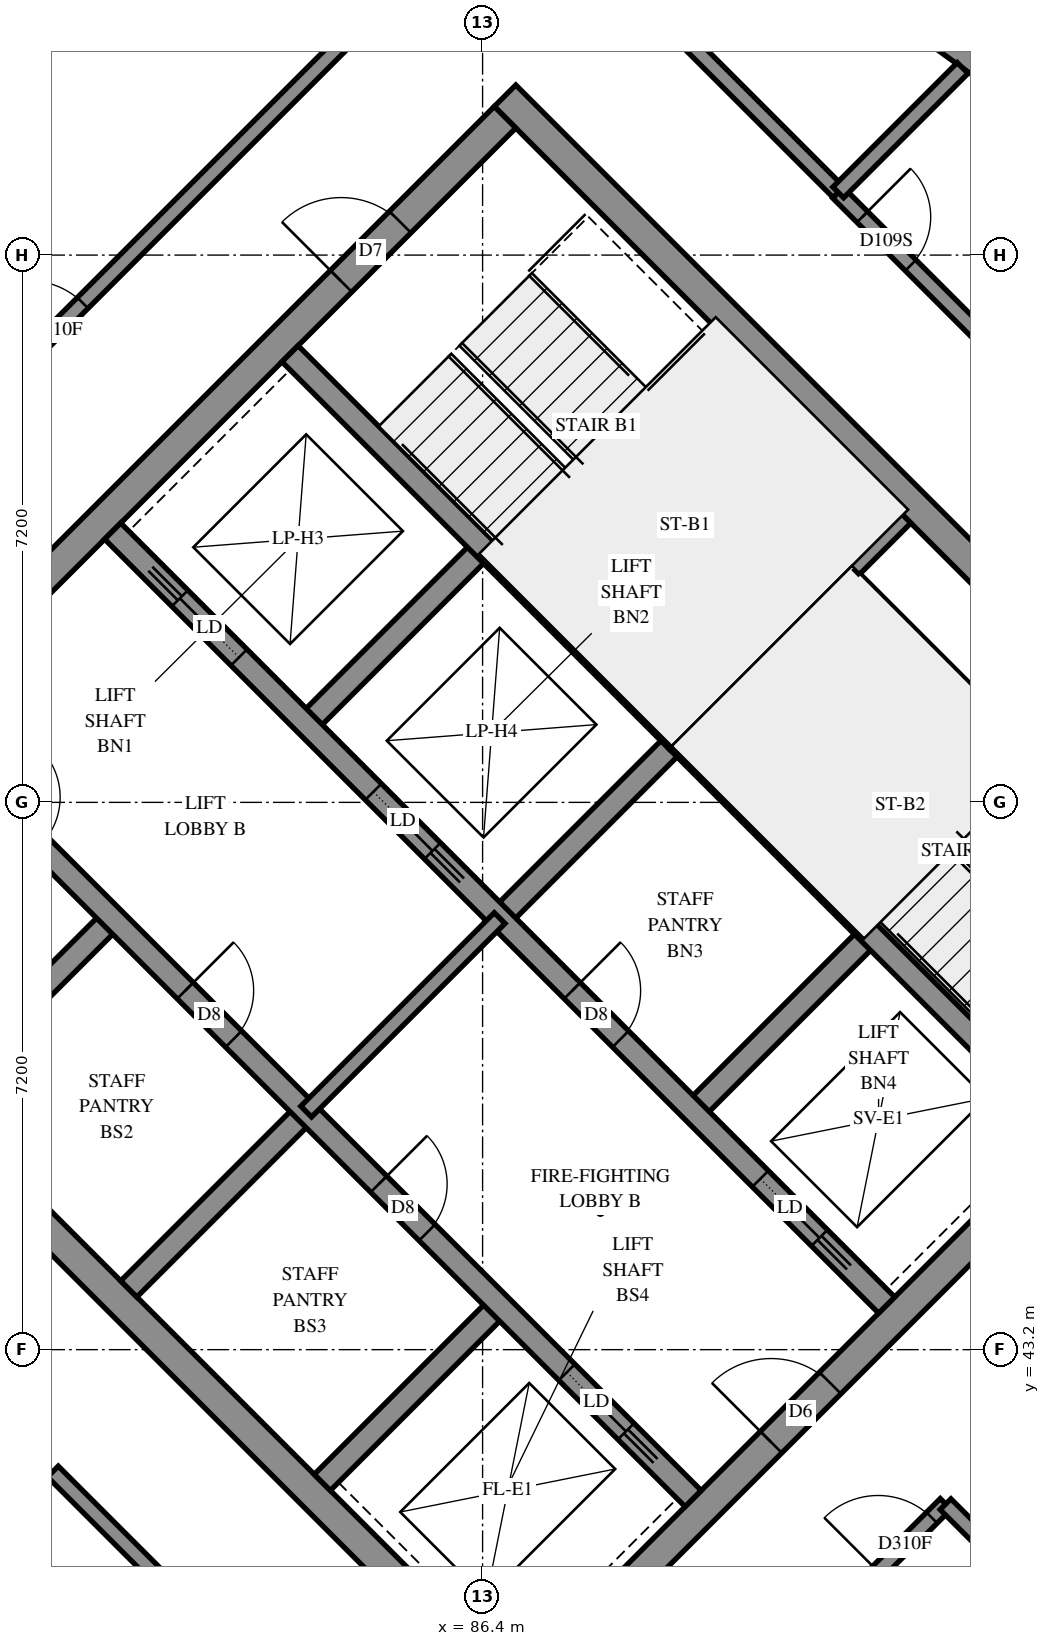
"""IFC4 building model, lengths in metres.
Left out: names, types, materials, properties, quantities, classifications, styles, units other than length and angle.
Written with IfcOpenShell. Run it as: python <this file> out.ifc"""

import sys

from ifc_helpers import new_model, si_unit, direction, frame, frame_2d, origin, place, context, subcontext, project, spatial, polyline, rectangle, outline, extrude, element, fill, save


model = new_model("IFC4")
c1 = context("Model", 3, precision=1e-05, world=origin(), true_north=direction((0.0, 1.0)))
c2 = subcontext(c1, "Body", "Model", "MODEL_VIEW")
j1 = project(units=[si_unit("LENGTHUNIT", "METRE"), si_unit("PLANEANGLEUNIT", "RADIAN")], contexts=[c1])
p1 = place(None, origin())
s1 = spatial("IfcSite", under=j1, at=p1, CompositionType="ELEMENT")
p2 = place(p1, origin())
s2 = spatial("IfcBuilding", under=s1, at=p2, CompositionType="ELEMENT")
p3 = place(p2, frame((0.0, 0.0, 271.0)))
s3 = spatial("IfcBuildingStorey", under=s2, at=p3, CompositionType="ELEMENT", Elevation=271.0)
p4 = place(p3, frame((76.23, 49.231, -0.3), z_axis=(0.0, 0.0, 1.0), x_axis=(0.7071034917, -0.7071100706, 0.0)))
e1 = element("IfcWall", 1, at=p4, inside=s3, PredefinedType="SHEAR", context=c2, shape_type="SweptSolid", body=[
    extrude(rectangle(XDim=15.2, YDim=0.4, at=frame_2d((7.6, 0.0))), origin(), (0.0, 0.0, 1.0), 2.7),
])
p5 = place(p3, frame((86.695, 59.696, -0.3), z_axis=(0.0, 0.0, 1.0), x_axis=(0.7071100706, -0.7071034917, 0.0)))
e2 = element("IfcWall", 2, at=p5, inside=s3, PredefinedType="SHEAR", context=c2, shape_type="SweptSolid", body=[
    extrude(rectangle(XDim=15.2, YDim=0.4, at=frame_2d((7.6, 0.0))), origin(), (0.0, 0.0, 1.0), 2.7),
])
p6 = place(p5, frame((10.4, 0.0, 0.3)))
e3 = element("IfcOpeningElement", 3, at=p6, cuts=e2, PredefinedType="OPENING", context=c2, shape_type="SweptSolid", body=[
    extrude(rectangle(XDim=0.8, YDim=2.1, at=frame_2d((0.4, 1.05))), frame((0.0, 0.21, 0.0), z_axis=(0.0, -1.0, 0.0), x_axis=(1.0, 0.0, 0.0)), (0.0, 0.0, 1.0), 0.42),
])
p7 = place(p3, frame((76.513, 49.231, -0.3), z_axis=(0.0, 0.0, 1.0), x_axis=(0.7071067812, 0.7071067812, 0.0)))
e4 = element("IfcWall", 4, at=p7, inside=s3, PredefinedType="SHEAR", context=c2, shape_type="SweptSolid", body=[
    extrude(rectangle(XDim=14.4, YDim=0.4, at=frame_2d((7.2, 0.0))), origin(), (0.0, 0.0, 1.0), 2.7),
])
p8 = place(p7, frame((4.55, 0.0, 0.3)))
e5 = element("IfcOpeningElement", 5, at=p8, cuts=e4, PredefinedType="OPENING", context=c2, shape_type="SweptSolid", body=[
    extrude(rectangle(XDim=1.1, YDim=2.1, at=frame_2d((0.55, 1.05))), frame((0.0, 0.21, 0.0), z_axis=(0.0, -1.0, 0.0), x_axis=(1.0, 0.0, 0.0)), (0.0, 0.0, 1.0), 0.42),
])
p9 = place(p7, frame((11.35, 0.0, 0.3)))
e6 = element("IfcOpeningElement", 6, at=p9, cuts=e4, PredefinedType="OPENING", context=c2, shape_type="SweptSolid", body=[
    extrude(rectangle(XDim=1.1, YDim=2.1, at=frame_2d((0.55, 1.05))), frame((0.0, 0.21, 0.0), z_axis=(0.0, -1.0, 0.0), x_axis=(1.0, 0.0, 0.0)), (0.0, 0.0, 1.0), 0.42),
])
p10 = place(p3, frame((86.978, 38.766, -0.3), z_axis=(0.0, 0.0, 1.0), x_axis=(0.7071067812, 0.7071067812, 0.0)))
e7 = element("IfcWall", 7, at=p10, inside=s3, PredefinedType="SHEAR", context=c2, shape_type="SweptSolid", body=[
    extrude(rectangle(XDim=14.4, YDim=0.4, at=frame_2d((7.2, 0.0))), origin(), (0.0, 0.0, 1.0), 2.7),
])
p11 = place(p10, frame((4.55, 0.0, 0.3)))
e8 = element("IfcOpeningElement", 8, at=p11, cuts=e7, PredefinedType="OPENING", context=c2, shape_type="SweptSolid", body=[
    extrude(rectangle(XDim=1.1, YDim=2.1, at=frame_2d((0.55, 1.05))), frame((0.0, 0.21, 0.0), z_axis=(0.0, -1.0, 0.0), x_axis=(1.0, 0.0, 0.0)), (0.0, 0.0, 1.0), 0.42),
])
p12 = place(p10, frame((11.35, 0.0, 0.3)))
e9 = element("IfcOpeningElement", 9, at=p12, cuts=e7, PredefinedType="OPENING", context=c2, shape_type="SweptSolid", body=[
    extrude(rectangle(XDim=1.1, YDim=2.1, at=frame_2d((0.55, 1.05))), frame((0.0, 0.21, 0.0), z_axis=(0.0, -1.0, 0.0), x_axis=(1.0, 0.0, 0.0)), (0.0, 0.0, 1.0), 0.42),
])
for number, where, z_axis, x_axis in (
    (10, (79.2, 46.544, 0.0), (0.0, 0.0, 1.0), (0.707, 0.707, 0.0)),
    (11, (84.079, 51.423, 0.0), (0.0, 0.0, 1.0), (0.707, 0.707, 0.0)),
):
    element("IfcWall", number, at=place(p3, frame(where, z_axis=z_axis, x_axis=x_axis)), inside=s3, PredefinedType="SOLIDWALL", context=c2, shape_type="SweptSolid", body=[
        extrude(rectangle(XDim=3.3, YDim=0.3, at=frame_2d((1.65, 0.0))), origin(), (0.0, 0.0, 1.0), 3.1),
    ])
p13 = place(p3, frame((81.746, 43.999, 0.0), z_axis=(0.0, 0.0, 1.0), x_axis=(0.7071067812, 0.7071067812, 0.0)))
e12 = element("IfcWall", 12, at=p13, inside=s3, PredefinedType="SOLIDWALL", context=c2, shape_type="SweptSolid", body=[
    extrude(rectangle(XDim=3.3, YDim=0.3, at=frame_2d((1.65, 0.0))), origin(), (0.0, 0.0, 1.0), 3.1),
])
p14 = place(p3, frame((86.625, 48.878, 0.0), z_axis=(0.0, 0.0, 1.0), x_axis=(0.7071067812, 0.7071067812, 0.0)))
e13 = element("IfcWall", 13, at=p14, inside=s3, PredefinedType="SOLIDWALL", context=c2, shape_type="SweptSolid", body=[
    extrude(rectangle(XDim=3.3, YDim=0.3, at=frame_2d((1.65, 0.0))), origin(), (0.0, 0.0, 1.0), 3.1),
])
p15 = place(p3, frame((84.291, 41.453, 0.0), z_axis=(0.0, 0.0, 1.0), x_axis=(0.7071067812, 0.7071067812, 0.0)))
e14 = element("IfcWall", 14, at=p15, inside=s3, PredefinedType="SOLIDWALL", context=c2, shape_type="SweptSolid", body=[
    extrude(rectangle(XDim=3.3, YDim=0.3, at=frame_2d((1.65, 0.0))), origin(), (0.0, 0.0, 1.0), 3.1),
])
p16 = place(p3, frame((89.17, 46.332, 0.0), z_axis=(0.0, 0.0, 1.0), x_axis=(0.7071067812, 0.7071067812, 0.0)))
e15 = element("IfcWall", 15, at=p16, inside=s3, PredefinedType="SOLIDWALL", context=c2, shape_type="SweptSolid", body=[
    extrude(rectangle(XDim=3.3, YDim=0.3, at=frame_2d((1.65, 0.0))), origin(), (0.0, 0.0, 1.0), 3.1),
])
p17 = place(p3, frame((78.988, 51.423, 0.0), z_axis=(0.0, 0.0, 1.0), x_axis=(0.7071067812, -0.7071067812, 0.0)))
e16 = element("IfcWall", 16, at=p17, inside=s3, PredefinedType="SOLIDWALL", context=c2, shape_type="SweptSolid", body=[
    extrude(rectangle(XDim=14.4, YDim=0.3, at=frame_2d((7.2, 0.0))), origin(), (0.0, 0.0, 1.0), 3.1),
])
p18 = place(p17, frame((1.35, 0.0, 0.0)))
e17 = element("IfcOpeningElement", 17, at=p18, cuts=e16, PredefinedType="OPENING", context=c2, shape_type="SweptSolid", body=[
    extrude(rectangle(XDim=0.9, YDim=2.1, at=frame_2d((0.45, 1.05))), frame((0.0, 0.16, 0.0), z_axis=(0.0, -1.0, 0.0), x_axis=(1.0, 0.0, 0.0)), (0.0, 0.0, 1.0), 0.32),
])
p19 = place(p17, frame((4.95, 0.0, 0.0)))
e18 = element("IfcOpeningElement", 18, at=p19, cuts=e16, PredefinedType="OPENING", context=c2, shape_type="SweptSolid", body=[
    extrude(rectangle(XDim=0.9, YDim=2.1, at=frame_2d((0.45, 1.05))), frame((0.0, 0.16, 0.0), z_axis=(0.0, -1.0, 0.0), x_axis=(1.0, 0.0, 0.0)), (0.0, 0.0, 1.0), 0.32),
])
p20 = place(p17, frame((8.55, 0.0, 0.0)))
e19 = element("IfcOpeningElement", 19, at=p20, cuts=e16, PredefinedType="OPENING", context=c2, shape_type="SweptSolid", body=[
    extrude(rectangle(XDim=0.9, YDim=2.1, at=frame_2d((0.45, 1.05))), frame((0.0, 0.16, 0.0), z_axis=(0.0, -1.0, 0.0), x_axis=(1.0, 0.0, 0.0)), (0.0, 0.0, 1.0), 0.32),
])
p21 = place(p17, frame((12.05, 0.0, 0.0)))
e20 = element("IfcOpeningElement", 20, at=p21, cuts=e16, PredefinedType="OPENING", context=c2, shape_type="SweptSolid", body=[
    extrude(rectangle(XDim=1.1, YDim=2.1, at=frame_2d((0.55, 1.05))), frame((0.0, 0.16, 0.0), z_axis=(0.0, -1.0, 0.0), x_axis=(1.0, 0.0, 0.0)), (0.0, 0.0, 1.0), 0.32),
])
p22 = place(p3, frame((81.534, 53.969, 0.0), z_axis=(0.0, 0.0, 1.0), x_axis=(0.707103309, -0.7071102534, 0.0)))
e21 = element("IfcWall", 21, at=p22, inside=s3, PredefinedType="SOLIDWALL", context=c2, shape_type="SweptSolid", body=[
    extrude(rectangle(XDim=14.4, YDim=0.3, at=frame_2d((7.2, 0.0))), origin(), (0.0, 0.0, 1.0), 3.1),
])
p23 = place(p22, frame((8.55, 0.0, 0.0)))
e22 = element("IfcOpeningElement", 22, at=p23, cuts=e21, PredefinedType="OPENING", context=c2, shape_type="SweptSolid", body=[
    extrude(rectangle(XDim=0.9, YDim=2.1, at=frame_2d((0.45, 1.05))), frame((0.0, 0.16, 0.0), z_axis=(0.0, -1.0, 0.0), x_axis=(1.0, 0.0, 0.0)), (0.0, 0.0, 1.0), 0.32),
])
p24 = place(p22, frame((1.25, 0.0, 0.0)))
e23 = element("IfcOpeningElement", 23, at=p24, cuts=e21, PredefinedType="OPENING", context=c2, shape_type="SweptSolid", body=[
    extrude(rectangle(XDim=1.1, YDim=2.1, at=frame_2d((0.55, 1.05))), frame((0.0, 0.16, 0.0), z_axis=(0.0, -1.0, 0.0), x_axis=(1.0, 0.0, 0.0)), (0.0, 0.0, 1.0), 0.32),
])
p25 = place(p22, frame((4.85, 0.0, 0.0)))
e24 = element("IfcOpeningElement", 24, at=p25, cuts=e21, PredefinedType="OPENING", context=c2, shape_type="SweptSolid", body=[
    extrude(rectangle(XDim=1.1, YDim=2.1, at=frame_2d((0.55, 1.05))), frame((0.0, 0.16, 0.0), z_axis=(0.0, -1.0, 0.0), x_axis=(1.0, 0.0, 0.0)), (0.0, 0.0, 1.0), 0.32),
])
p26 = place(p22, frame((12.05, 0.0, 0.0)))
e25 = element("IfcOpeningElement", 25, at=p26, cuts=e21, PredefinedType="OPENING", context=c2, shape_type="SweptSolid", body=[
    extrude(rectangle(XDim=1.1, YDim=2.1, at=frame_2d((0.55, 1.05))), frame((0.0, 0.16, 0.0), z_axis=(0.0, -1.0, 0.0), x_axis=(1.0, 0.0, 0.0)), (0.0, 0.0, 1.0), 0.32),
])
for number, where, z_axis, x_axis in (
    (26, (83.867, 56.302, 0.0), (0.0, 0.0, 1.0), (0.707, -0.707, 0.0)),
    (27, (88.958, 51.211, 0.0), (0.0, 0.0, 1.0), (0.707, -0.707, 0.0)),
):
    element("IfcWall", number, at=place(p3, frame(where, z_axis=z_axis, x_axis=x_axis)), inside=s3, PredefinedType="SOLIDWALL", context=c2, shape_type="SweptSolid", body=[
        extrude(rectangle(XDim=7.2, YDim=0.3, at=frame_2d((3.6, 0.0))), origin(), (0.0, 0.0, 1.0), 3.1),
    ])
p27 = place(p3, frame((88.958, 51.211, 0.0), z_axis=(0.0, 0.0, 1.0), x_axis=(0.7071067812, 0.7071067812, 0.0)))
e28 = element("IfcWall", 28, at=p27, inside=s3, PredefinedType="SOLIDWALL", context=c2, shape_type="SweptSolid", body=[
    extrude(rectangle(XDim=4.2, YDim=0.3, at=frame_2d((2.1, 0.0))), origin(), (0.0, 0.0, 1.0), 3.1),
])
p28 = place(p3, frame((93.742, 59.599, 0.0), z_axis=(0.0, 0.0, 1.0), x_axis=(-0.8113222169, 0.5845992306, 0.0)))
e29 = element("IfcWall", 29, at=p28, inside=s3, PredefinedType="SOLIDWALL", context=c2, shape_type="SweptSolid", body=[
    extrude(outline(polyline([(-0.036, -0.225), (3.344, -0.225), (3.417, 0.225), (0.036, 0.225), (-0.036, -0.225)])), origin(), (0.0, 0.0, 1.0), 3.1),
])
p29 = place(p28, frame((1.523, 0.0, 0.45)))
e30 = element("IfcOpeningElement", 30, at=p29, cuts=e29, PredefinedType="OPENING", context=c2, shape_type="SweptSolid", body=[
    extrude(rectangle(XDim=1.2, YDim=2.55, at=frame_2d((0.6, 1.275))), frame((0.0, 0.235, 0.0), z_axis=(0.0, -1.0, 0.0), x_axis=(1.0, 0.0, 0.0)), (0.0, 0.0, 1.0), 0.47),
])
p30 = place(p3, frame((91.313, 53.354, 0.0), z_axis=(0.0, 0.0, 1.0), x_axis=(0.7071067812, -0.7071067812, 0.0)))
e31 = element("IfcWall", 31, at=p30, inside=s3, PredefinedType="PARTITIONING", context=c2, shape_type="SweptSolid", body=[
    extrude(rectangle(XDim=5.95, YDim=0.15, at=frame_2d((2.975, 0.0))), origin(), (0.0, 0.0, 1.0), 3.1),
])
p31 = place(p3, frame((84.079, 46.332, 0.0), z_axis=(0.0, 0.0, 1.0), x_axis=(0.7071067812, 0.7071067812, 0.0)))
e32 = element("IfcWall", 32, at=p31, inside=s3, PredefinedType="PARTITIONING", context=c2, shape_type="SweptSolid", body=[
    extrude(rectangle(XDim=3.6, YDim=0.2, at=frame_2d((1.8, 0.0))), origin(), (0.0, 0.0, 1.0), 3.1),
])
p32 = place(p3, frame((84.97, 31.951, 0.0), z_axis=(0.0, 0.0, 1.0), x_axis=(0.7071025578, 0.7071110045, 0.0)))
e33 = element("IfcWall", 33, at=p32, inside=s3, PredefinedType="PARTITIONING", context=c2, shape_type="SweptSolid", body=[
    extrude(rectangle(XDim=11.839, YDim=0.2, at=frame_2d((5.92, 0.0))), origin(), (0.0, 0.0, 1.0), 3.1),
])
p33 = place(p3, frame((80.332, 56.163, 0.0), z_axis=(0.0, 0.0, 1.0), x_axis=(0.7071067812, 0.7071067812, 0.0)))
e34 = element("IfcWall", 34, at=p33, inside=s3, PredefinedType="PARTITIONING", context=c2, shape_type="SweptSolid", body=[
    extrude(rectangle(XDim=9.198, YDim=0.2, at=frame_2d((4.599, 0.0))), origin(), (0.0, 0.0, 1.0), 3.1),
])
p34 = place(p33, frame((0.143, 0.0, 0.0)))
e35 = element("IfcOpeningElement", 35, at=p34, cuts=e34, PredefinedType="OPENING", context=c2, shape_type="SweptSolid", body=[
    extrude(rectangle(XDim=1.0, YDim=2.1, at=frame_2d((0.5, 1.05))), frame((0.0, 0.11, 0.0), z_axis=(0.0, -1.0, 0.0), x_axis=(1.0, 0.0, 0.0)), (0.0, 0.0, 1.0), 0.22),
])
p35 = place(p3, frame((80.747, 41.597, 0.0), z_axis=(0.0, 0.0, 1.0), x_axis=(0.7071067812, -0.7071067812, 0.0)))
e36 = element("IfcWall", 36, at=p35, inside=s3, PredefinedType="PARTITIONING", context=c2, shape_type="SweptSolid", body=[
    extrude(rectangle(XDim=8.607, YDim=0.2, at=frame_2d((4.303, 0.0))), origin(), (0.0, 0.0, 1.0), 3.1),
])
p36 = place(p35, frame((2.903, 0.0, 0.0)))
e37 = element("IfcOpeningElement", 37, at=p36, cuts=e36, PredefinedType="OPENING", context=c2, shape_type="SweptSolid", body=[
    extrude(rectangle(XDim=1.0, YDim=2.1, at=frame_2d((0.5, 1.05))), frame((0.0, 0.11, 0.0), z_axis=(0.0, -1.0, 0.0), x_axis=(1.0, 0.0, 0.0)), (0.0, 0.0, 1.0), 0.22),
])
p37 = place(p3, frame((86.836, 35.514, 0.0), z_axis=(0.0, 0.0, 1.0), x_axis=(0.7071067812, 0.7071067812, 0.0)))
e38 = element("IfcWall", 38, at=p37, inside=s3, PredefinedType="PARTITIONING", context=c2, shape_type="SweptSolid", body=[
    extrude(rectangle(XDim=7.999, YDim=0.2, at=frame_2d((3.999, 0.0))), origin(), (0.0, 0.0, 1.0), 3.1),
])
p38 = place(p37, frame((6.742, 0.0, 0.0)))
e39 = element("IfcOpeningElement", 39, at=p38, cuts=e38, PredefinedType="OPENING", context=c2, shape_type="SweptSolid", body=[
    extrude(rectangle(XDim=1.0, YDim=2.1, at=frame_2d((0.5, 1.05))), frame((0.0, 0.11, 0.0), z_axis=(0.0, -1.0, 0.0), x_axis=(1.0, 0.0, 0.0)), (0.0, 0.0, 1.0), 0.22),
])
p39 = place(p3, frame((92.491, 41.167, 0.0), z_axis=(0.0, 0.0, 1.0), x_axis=(0.7071067812, -0.7071067812, 0.0)))
e40 = element("IfcWall", 40, at=p39, inside=s3, PredefinedType="PARTITIONING", context=c2, shape_type="SweptSolid", body=[
    extrude(rectangle(XDim=4.8, YDim=0.2, at=frame_2d((2.4, 0.0))), origin(), (0.0, 0.0, 1.0), 3.1),
])
p40 = place(p39, frame((1.767, 0.0, 0.0)))
e41 = element("IfcOpeningElement", 41, at=p40, cuts=e40, PredefinedType="OPENING", context=c2, shape_type="SweptSolid", body=[
    extrude(rectangle(XDim=1.0, YDim=2.1, at=frame_2d((0.5, 1.05))), frame((0.0, 0.11, 0.0), z_axis=(0.0, -1.0, 0.0), x_axis=(1.0, 0.0, 0.0)), (0.0, 0.0, 1.0), 0.22),
])
p41 = place(p3, frame((88.537, 60.973, 0.0), z_axis=(0.0, 0.0, 1.0), x_axis=(0.7071067812, -0.7071067812, 0.0)))
e42 = element("IfcWall", 42, at=p41, inside=s3, PredefinedType="PARTITIONING", context=c2, shape_type="SweptSolid", body=[
    extrude(rectangle(XDim=3.601, YDim=0.2, at=frame_2d((1.8, 0.0))), origin(), (0.0, 0.0, 1.0), 3.1),
])
p42 = place(p3, frame((91.077, 58.421, 0.0), z_axis=(0.0, 0.0, 1.0), x_axis=(0.7068288851, -0.7073845681, 0.0)))
e43 = element("IfcWall", 43, at=p42, inside=s3, PredefinedType="PARTITIONING", context=c2, shape_type="SweptSolid", body=[
    extrude(rectangle(XDim=3.599, YDim=0.2, at=frame_2d((1.8, 0.0))), origin(), (0.0, 0.0, 1.0), 3.1),
])
p43 = place(p42, frame((0.451, 0.0, 0.0)))
e44 = element("IfcOpeningElement", 44, at=p43, cuts=e43, PredefinedType="OPENING", context=c2, shape_type="SweptSolid", body=[
    extrude(rectangle(XDim=0.9, YDim=2.1, at=frame_2d((0.45, 1.05))), frame((0.0, 0.11, 0.0), z_axis=(0.0, -1.0, 0.0), x_axis=(1.0, 0.0, 0.0)), (0.0, 0.0, 1.0), 0.22),
])
p44 = place(p3, frame((91.079, 58.425, 0.0), z_axis=(0.0, 0.0, 1.0), x_axis=(0.7071067812, 0.7071067812, 0.0)))
e45 = element("IfcWall", 45, at=p44, inside=s3, PredefinedType="PARTITIONING", context=c2, shape_type="SweptSolid", body=[
    extrude(rectangle(XDim=2.314, YDim=0.2, at=frame_2d((1.157, 0.0))), origin(), (0.0, 0.0, 1.0), 3.1),
])
p45 = place(p11, origin())
e46 = element("IfcDoor", 46, at=p45, inside=s3, OperationType="DOUBLE_DOOR_SINGLE_SWING", PredefinedType="DOOR", context=c2, shape_type="SweptSolid", body=[
    extrude(rectangle(XDim=1.1, YDim=2.1, at=frame_2d((0.55, 1.05))), frame((0.0, 0.025, 0.0), z_axis=(0.0, -1.0, 0.0), x_axis=(1.0, 0.0, 0.0)), (0.0, 0.0, 1.0), 0.05),
])
fill(e8, e46)
p46 = place(p9, origin())
e47 = element("IfcDoor", 47, at=p46, inside=s3, OperationType="SINGLE_SWING_LEFT", PredefinedType="DOOR", context=c2, shape_type="SweptSolid", body=[
    extrude(rectangle(XDim=1.1, YDim=2.1, at=frame_2d((0.55, 1.05))), frame((0.0, 0.025, 0.0), z_axis=(0.0, -1.0, 0.0), x_axis=(1.0, 0.0, 0.0)), (0.0, 0.0, 1.0), 0.05),
])
fill(e6, e47)
p47 = place(p19, origin())
e48 = element("IfcDoor", 48, at=p47, inside=s3, OperationType="SINGLE_SWING_LEFT", PredefinedType="DOOR", context=c2, shape_type="SweptSolid", body=[
    extrude(rectangle(XDim=0.9, YDim=2.1, at=frame_2d((0.45, 1.05))), frame((0.0, 0.025, 0.0), z_axis=(0.0, -1.0, 0.0), x_axis=(1.0, 0.0, 0.0)), (0.0, 0.0, 1.0), 0.05),
])
fill(e18, e48)
p48 = place(p20, origin())
e49 = element("IfcDoor", 49, at=p48, inside=s3, OperationType="SINGLE_SWING_LEFT", PredefinedType="DOOR", context=c2, shape_type="SweptSolid", body=[
    extrude(rectangle(XDim=0.9, YDim=2.1, at=frame_2d((0.45, 1.05))), frame((0.0, 0.025, 0.0), z_axis=(0.0, -1.0, 0.0), x_axis=(1.0, 0.0, 0.0)), (0.0, 0.0, 1.0), 0.05),
])
fill(e19, e49)
p49 = place(p23, origin())
e50 = element("IfcDoor", 50, at=p49, inside=s3, OperationType="SINGLE_SWING_LEFT", PredefinedType="DOOR", context=c2, shape_type="SweptSolid", body=[
    extrude(rectangle(XDim=0.9, YDim=2.1, at=frame_2d((0.45, 1.05))), frame((0.0, 0.025, 0.0), z_axis=(0.0, -1.0, 0.0), x_axis=(1.0, 0.0, 0.0)), (0.0, 0.0, 1.0), 0.05),
])
fill(e22, e50)
p50 = place(p21, origin())
e51 = element("IfcDoor", 51, at=p50, inside=s3, OperationType="SLIDING_TO_RIGHT", PredefinedType="DOOR", context=c2, shape_type="SweptSolid", body=[
    extrude(rectangle(XDim=1.1, YDim=2.1, at=frame_2d((0.55, 1.05))), frame((0.0, 0.025, 0.0), z_axis=(0.0, -1.0, 0.0), x_axis=(1.0, 0.0, 0.0)), (0.0, 0.0, 1.0), 0.05),
])
fill(e20, e51)
p51 = place(p24, origin())
e52 = element("IfcDoor", 52, at=p51, inside=s3, OperationType="SLIDING_TO_LEFT", PredefinedType="DOOR", context=c2, shape_type="SweptSolid", body=[
    extrude(rectangle(XDim=1.1, YDim=2.1, at=frame_2d((0.55, 1.05))), frame((0.0, 0.025, 0.0), z_axis=(0.0, -1.0, 0.0), x_axis=(1.0, 0.0, 0.0)), (0.0, 0.0, 1.0), 0.05),
])
fill(e23, e52)
p52 = place(p25, origin())
e53 = element("IfcDoor", 53, at=p52, inside=s3, OperationType="SLIDING_TO_RIGHT", PredefinedType="DOOR", context=c2, shape_type="SweptSolid", body=[
    extrude(rectangle(XDim=1.1, YDim=2.1, at=frame_2d((0.55, 1.05))), frame((0.0, 0.025, 0.0), z_axis=(0.0, -1.0, 0.0), x_axis=(1.0, 0.0, 0.0)), (0.0, 0.0, 1.0), 0.05),
])
fill(e24, e53)
p53 = place(p26, origin())
e54 = element("IfcDoor", 54, at=p53, inside=s3, OperationType="SLIDING_TO_RIGHT", PredefinedType="DOOR", context=c2, shape_type="SweptSolid", body=[
    extrude(rectangle(XDim=1.1, YDim=2.1, at=frame_2d((0.55, 1.05))), frame((0.0, 0.025, 0.0), z_axis=(0.0, -1.0, 0.0), x_axis=(1.0, 0.0, 0.0)), (0.0, 0.0, 1.0), 0.05),
])
fill(e25, e54)
p54 = place(p34, origin())
e55 = element("IfcDoor", 55, at=p54, inside=s3, OperationType="SINGLE_SWING_LEFT", PredefinedType="DOOR", context=c2, shape_type="SweptSolid", body=[
    extrude(rectangle(XDim=1.0, YDim=2.1, at=frame_2d((0.5, 1.05))), frame((0.0, 0.025, 0.0), z_axis=(0.0, -1.0, 0.0), x_axis=(1.0, 0.0, 0.0)), (0.0, 0.0, 1.0), 0.05),
])
fill(e35, e55)
p55 = place(p43, origin())
e56 = element("IfcDoor", 56, at=p55, inside=s3, OperationType="SINGLE_SWING_RIGHT", PredefinedType="DOOR", context=c2, shape_type="SweptSolid", body=[
    extrude(rectangle(XDim=0.9, YDim=2.1, at=frame_2d((0.45, 1.05))), frame((0.0, 0.025, 0.0), z_axis=(0.0, -1.0, 0.0), x_axis=(1.0, 0.0, 0.0)), (0.0, 0.0, 1.0), 0.05),
])
fill(e44, e56)
p56 = place(p38, origin())
e57 = element("IfcDoor", 57, at=p56, inside=s3, OperationType="SINGLE_SWING_RIGHT", PredefinedType="DOOR", context=c2, shape_type="SweptSolid", body=[
    extrude(rectangle(XDim=1.0, YDim=2.1, at=frame_2d((0.5, 1.05))), frame((0.0, 0.025, 0.0), z_axis=(0.0, -1.0, 0.0), x_axis=(1.0, 0.0, 0.0)), (0.0, 0.0, 1.0), 0.05),
])
fill(e39, e57)
save(model, sys.argv[1])
